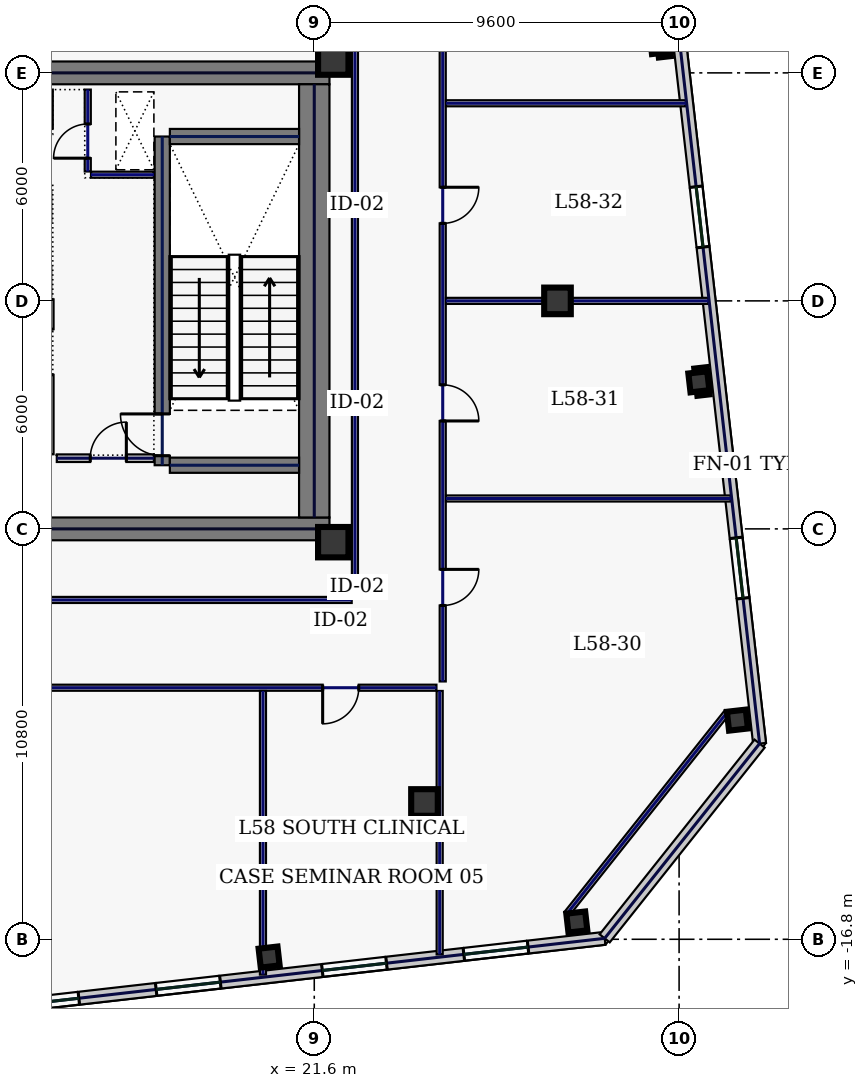
"""IFC4 building model, lengths in metres.
Left out: names, types, materials, properties, quantities, classifications, styles, units other than length and angle.
Written with IfcOpenShell. Run it as: python <this file> out.ifc"""

import sys

from ifc_helpers import new_model, si_unit, direction, frame, frame_2d, origin, origin_2d, place, context, subcontext, project, spatial, rectangle, hollow_rectangle, extrude, element, fill, save


model = new_model("IFC4")
c1 = context("Model", 3, precision=1e-05, world=origin(), true_north=direction((0.0, 1.0)))
c2 = subcontext(c1, "Body", "Model", "MODEL_VIEW")
j1 = project(units=[si_unit("LENGTHUNIT", "METRE"), si_unit("PLANEANGLEUNIT", "RADIAN")], contexts=[c1])
p1 = place(None, origin())
s1 = spatial("IfcSite", under=j1, at=p1, CompositionType="ELEMENT")
p2 = place(p1, origin())
s2 = spatial("IfcBuilding", under=s1, at=p2, CompositionType="ELEMENT")
p3 = place(p2, frame((0.0, 0.0, 251.0)))
s3 = spatial("IfcBuildingStorey", under=s2, at=p3, CompositionType="ELEMENT", Elevation=251.0)
for number, where, z_axis, x_axis in (
    (1, (10.5, 6.0, 0.0), (0.0, 0.0, 1.0), (1.0, 0.0, 0.0)),
    (2, (10.5, -6.0, 0.0), (0.0, 0.0, 1.0), (1.0, 0.0, 0.0)),
):
    element("IfcWall", number, at=place(p3, frame(where, z_axis=z_axis, x_axis=x_axis)), inside=s3, PredefinedType="SHEAR", context=c2, shape_type="SweptSolid", body=[
        extrude(rectangle(XDim=11.5, YDim=0.6, at=frame_2d((5.75, 0.0))), origin(), (0.0, 0.0, 1.0), 3.74),
    ])
p4 = place(p3, frame((21.6, -5.7, 0.0), z_axis=(0.0, 0.0, 1.0), x_axis=(0.0, 1.0, 0.0)))
e3 = element("IfcWall", 3, at=p4, inside=s3, PredefinedType="SHEAR", context=c2, shape_type="SweptSolid", body=[
    extrude(rectangle(XDim=11.4, YDim=0.8, at=frame_2d((5.7, 0.0))), origin(), (0.0, 0.0, 1.0), 3.74),
])
p5 = place(p3, frame((17.6, -4.325, 0.0), z_axis=(0.0, 0.0, 1.0), x_axis=(0.0, 1.0, 0.0)))
e4 = element("IfcWall", 4, at=p5, inside=s3, PredefinedType="SHEAR", context=c2, shape_type="SweptSolid", body=[
    extrude(rectangle(XDim=8.65, YDim=0.4, at=frame_2d((4.325, 0.0))), origin(), (0.0, 0.0, 1.0), 3.74),
])
p6 = place(p5, frame((0.25, 0.0, 0.0)))
e5 = element("IfcOpeningElement", 5, at=p6, cuts=e4, PredefinedType="OPENING", context=c2, shape_type="SweptSolid", body=[
    extrude(rectangle(XDim=1.1, YDim=2.2, at=frame_2d((0.55, 1.1))), frame((0.0, 0.21, 0.0), z_axis=(0.0, -1.0, 0.0), x_axis=(1.0, 0.0, 0.0)), (0.0, 0.0, 1.0), 0.42),
])
for number, where, z_axis, x_axis in (
    (6, (17.8, -4.325, 0.0), (0.0, 0.0, 1.0), (1.0, 0.0, 0.0)),
    (7, (17.8, 4.325, 0.0), (0.0, 0.0, 1.0), (1.0, 0.0, 0.0)),
):
    element("IfcWall", number, at=place(p3, frame(where, z_axis=z_axis, x_axis=x_axis)), inside=s3, PredefinedType="SHEAR", context=c2, shape_type="SweptSolid", body=[
        extrude(rectangle(XDim=3.4, YDim=0.4, at=frame_2d((1.7, 0.0))), origin(), (0.0, 0.0, 1.0), 3.74),
    ])
for number, where, z_axis, x_axis in (
    (8, (22.1, -6.35, 0.0), (0.0, 0.0, 1.0), (1.0, 0.0, 0.0)),
    (9, (22.1, 6.35, 0.0), (0.0, 0.0, 1.0), (1.0, 0.0, 0.0)),
):
    element("IfcColumn", number, at=place(p3, frame(where, z_axis=z_axis, x_axis=x_axis)), inside=s3, PredefinedType="COLUMN", context=c2, shape_type="SweptSolid", body=[
        extrude(hollow_rectangle(XDim=0.8, YDim=0.8, WallThickness=0.036, at=origin_2d()), origin(), (0.0, 0.0, 1.0), 3.74),
    ])
for number, where, z_axis, x_axis in (
    (10, (24.5, -13.2, 0.0), (0.0, 0.0, 1.0), (1.0, 0.0, 0.0)),
    (11, (28.0, 0.0, 0.0), (0.0, 0.0, 1.0), (1.0, 0.0, 0.0)),
):
    element("IfcColumn", number, at=place(p3, frame(where, z_axis=z_axis, x_axis=x_axis)), inside=s3, PredefinedType="COLUMN", context=c2, shape_type="SweptSolid", body=[
        extrude(hollow_rectangle(XDim=0.7, YDim=0.7, WallThickness=0.032, at=origin_2d()), origin(), (0.0, 0.0, 1.0), 3.74),
    ])
for number, where, z_axis, x_axis in (
    (12, (20.412, -17.268, 0.0), (0.0, 0.0, 1.0), (0.994, 0.113, 0.0)),
    (13, (28.509, -16.345, 0.0), (0.0, 0.0, 1.0), (0.994, 0.113, 0.0)),
    (14, (32.734, -11.033, 0.0), (0.0, 0.0, 1.0), (0.994, 0.113, 0.0)),
    (15, (31.72, -2.131, 0.0), (0.0, 0.0, 1.0), (0.994, 0.113, 0.0)),
    (16, (30.706, 6.772, 0.0), (0.0, 0.0, 1.0), (0.994, 0.113, 0.0)),
):
    element("IfcColumn", number, at=place(p3, frame(where, z_axis=z_axis, x_axis=x_axis)), inside=s3, PredefinedType="COLUMN", context=c2, shape_type="SweptSolid", body=[
        extrude(hollow_rectangle(XDim=0.5, YDim=0.5, WallThickness=0.025, at=origin_2d()), origin(), (0.0, 0.0, 1.0), 3.74),
    ])
p7 = place(p3, frame((10.71, -18.886, 0.0), z_axis=(0.0, 0.0, 1.0), x_axis=(0.993572271362, 0.113199565282, 0.0)))
e17 = element("IfcWall", 17, at=p7, inside=s3, PredefinedType="STANDARD", context=c2, shape_type="SweptSolid", body=[
    extrude(rectangle(XDim=18.651, YDim=0.34, at=frame_2d((9.326, 0.0))), origin(), (0.0, 0.0, 1.0), 3.74),
])
p8 = place(p7, frame((3.024, 0.0, 0.88)))
e18 = element("IfcOpeningElement", 18, at=p8, cuts=e17, PredefinedType="OPENING", context=c2, shape_type="SweptSolid", body=[
    extrude(rectangle(XDim=1.7, YDim=1.95, at=frame_2d((0.85, 0.975))), frame((0.0, 0.18, 0.0), z_axis=(0.0, -1.0, 0.0), x_axis=(1.0, 0.0, 0.0)), (0.0, 0.0, 1.0), 0.36),
])
p9 = place(p7, frame((6.773, 0.0, 0.88)))
e19 = element("IfcOpeningElement", 19, at=p9, cuts=e17, PredefinedType="OPENING", context=c2, shape_type="SweptSolid", body=[
    extrude(rectangle(XDim=1.7, YDim=1.95, at=frame_2d((0.85, 0.975))), frame((0.0, 0.18, 0.0), z_axis=(0.0, -1.0, 0.0), x_axis=(1.0, 0.0, 0.0)), (0.0, 0.0, 1.0), 0.36),
])
p10 = place(p7, frame((11.173, 0.0, 0.88)))
e20 = element("IfcOpeningElement", 20, at=p10, cuts=e17, PredefinedType="OPENING", context=c2, shape_type="SweptSolid", body=[
    extrude(rectangle(XDim=1.7, YDim=1.95, at=frame_2d((0.85, 0.975))), frame((0.0, 0.18, 0.0), z_axis=(0.0, -1.0, 0.0), x_axis=(1.0, 0.0, 0.0)), (0.0, 0.0, 1.0), 0.36),
])
p11 = place(p7, frame((14.921, 0.0, 0.88)))
e21 = element("IfcOpeningElement", 21, at=p11, cuts=e17, PredefinedType="OPENING", context=c2, shape_type="SweptSolid", body=[
    extrude(rectangle(XDim=1.7, YDim=1.95, at=frame_2d((0.85, 0.975))), frame((0.0, 0.18, 0.0), z_axis=(0.0, -1.0, 0.0), x_axis=(1.0, 0.0, 0.0)), (0.0, 0.0, 1.0), 0.36),
])
p12 = place(p3, frame((33.318, -11.651, 0.0), z_axis=(0.0, 0.0, 1.0), x_axis=(-0.11320360501, 0.9935718111, 0.0)))
e22 = element("IfcWall", 22, at=p12, inside=s3, PredefinedType="STANDARD", context=c2, shape_type="SweptSolid", body=[
    extrude(rectangle(XDim=37.2, YDim=0.34, at=frame_2d((18.6, 0.0))), origin(), (0.0, 0.0, 1.0), 3.74),
])
p13 = place(p12, frame((3.85, 0.0, 0.58)))
e23 = element("IfcOpeningElement", 23, at=p13, cuts=e22, PredefinedType="OPENING", context=c2, shape_type="SweptSolid", body=[
    extrude(rectangle(XDim=1.6, YDim=2.3, at=frame_2d((0.8, 1.15))), frame((0.0, 0.18, 0.0), z_axis=(0.0, -1.0, 0.0), x_axis=(1.0, 0.0, 0.0)), (0.0, 0.0, 1.0), 0.36),
])
p14 = place(p12, frame((13.15, 0.0, 0.58)))
e24 = element("IfcOpeningElement", 24, at=p14, cuts=e22, PredefinedType="OPENING", context=c2, shape_type="SweptSolid", body=[
    extrude(rectangle(XDim=1.6, YDim=2.3, at=frame_2d((0.8, 1.15))), frame((0.0, 0.18, 0.0), z_axis=(0.0, -1.0, 0.0), x_axis=(1.0, 0.0, 0.0)), (0.0, 0.0, 1.0), 0.36),
])
p15 = place(p12, frame((22.45, 0.0, 0.58)))
e25 = element("IfcOpeningElement", 25, at=p15, cuts=e22, PredefinedType="OPENING", context=c2, shape_type="SweptSolid", body=[
    extrude(rectangle(XDim=1.6, YDim=2.3, at=frame_2d((0.8, 1.15))), frame((0.0, 0.18, 0.0), z_axis=(0.0, -1.0, 0.0), x_axis=(1.0, 0.0, 0.0)), (0.0, 0.0, 1.0), 0.36),
])
p16 = place(p12, frame((31.75, 0.0, 0.58)))
e26 = element("IfcOpeningElement", 26, at=p16, cuts=e22, PredefinedType="OPENING", context=c2, shape_type="SweptSolid", body=[
    extrude(rectangle(XDim=1.6, YDim=2.3, at=frame_2d((0.8, 1.15))), frame((0.0, 0.18, 0.0), z_axis=(0.0, -1.0, 0.0), x_axis=(1.0, 0.0, 0.0)), (0.0, 0.0, 1.0), 0.36),
])
p17 = place(p3, frame((29.242, -16.775, 0.0), z_axis=(0.0, 0.0, 1.0), x_axis=(0.62252823689, 0.78259733853, 0.0)))
e27 = element("IfcWall", 27, at=p17, inside=s3, PredefinedType="STANDARD", context=c2, shape_type="SweptSolid", body=[
    extrude(rectangle(XDim=6.548, YDim=0.34, at=frame_2d((3.274, 0.0))), origin(), (0.0, 0.0, 1.0), 3.74),
])
p18 = place(p3, frame((15.64, 3.405, 0.0), z_axis=(0.0, 0.0, 1.0), x_axis=(0.0, 1.0, 0.0)))
e28 = element("IfcWall", 28, at=p18, inside=s3, PredefinedType="PARTITIONING", context=c2, shape_type="SweptSolid", body=[
    extrude(rectangle(XDim=2.155, YDim=0.16, at=frame_2d((1.078, 0.0))), origin(), (0.0, 0.0, 1.0), 3.74),
])
p19 = place(p18, frame((0.35, 0.0, 0.0)))
e29 = element("IfcOpeningElement", 29, at=p19, cuts=e28, PredefinedType="OPENING", context=c2, shape_type="SweptSolid", body=[
    extrude(rectangle(XDim=0.9, YDim=2.2, at=frame_2d((0.45, 1.1))), frame((0.0, 0.09, 0.0), z_axis=(0.0, -1.0, 0.0), x_axis=(1.0, 0.0, 0.0)), (0.0, 0.0, 1.0), 0.18),
])
p20 = place(p3, frame((15.725, 3.32, 0.0), z_axis=(0.0, 0.0, 1.0), x_axis=(1.0, 0.0, 0.0)))
e30 = element("IfcWall", 30, at=p20, inside=s3, PredefinedType="PARTITIONING", context=c2, shape_type="SweptSolid", body=[
    extrude(rectangle(XDim=1.655, YDim=0.16, at=frame_2d((0.827, 0.0))), origin(), (0.0, 0.0, 1.0), 3.74),
])
p21 = place(p3, frame((14.825, -4.14, 0.0), z_axis=(0.0, 0.0, 1.0), x_axis=(1.0, 0.0, 0.0)))
e31 = element("IfcWall", 31, at=p21, inside=s3, PredefinedType="SOLIDWALL", context=c2, shape_type="SweptSolid", body=[
    extrude(rectangle(XDim=2.555, YDim=0.2, at=frame_2d((1.277, 0.0))), origin(), (0.0, 0.0, 1.0), 3.74),
])
p22 = place(p21, frame((0.88, 0.0, 0.0)))
e32 = element("IfcOpeningElement", 32, at=p22, cuts=e31, PredefinedType="OPENING", context=c2, shape_type="SweptSolid", body=[
    extrude(rectangle(XDim=0.95, YDim=2.2, at=frame_2d((0.475, 1.1))), frame((0.0, 0.11, 0.0), z_axis=(0.0, -1.0, 0.0), x_axis=(1.0, 0.0, 0.0)), (0.0, 0.0, 1.0), 0.22),
])
p23 = place(p3, frame((14.64, -4.035, 0.0), z_axis=(0.0, 0.0, 1.0), x_axis=(0.0, 1.0, 0.0)))
e33 = element("IfcWall", 33, at=p23, inside=s3, PredefinedType="SOLIDWALL", context=c2, shape_type="SweptSolid", body=[
    extrude(rectangle(XDim=4.075, YDim=0.2, at=frame_2d((2.038, 0.0))), origin(), (0.0, 0.0, 1.0), 3.74),
])
p24 = place(p23, frame((2.09, 0.0, 0.0)))
e34 = element("IfcOpeningElement", 34, at=p24, cuts=e33, PredefinedType="OPENING", context=c2, shape_type="SweptSolid", body=[
    extrude(rectangle(XDim=1.2, YDim=2.2, at=frame_2d((0.6, 1.1))), frame((0.0, 0.11, 0.0), z_axis=(0.0, -1.0, 0.0), x_axis=(1.0, 0.0, 0.0)), (0.0, 0.0, 1.0), 0.22),
])
p25 = place(p3, frame((28.242, -16.134, 0.0), z_axis=(0.0, 0.0, 1.0), x_axis=(0.622521563328, 0.782602647064, 0.0)))
e35 = element("IfcWall", 35, at=p25, inside=s3, PredefinedType="PARTITIONING", context=c2, shape_type="SweptSolid", body=[
    extrude(rectangle(XDim=6.788, YDim=0.16, at=frame_2d((3.394, 0.0))), origin(), (0.0, 0.0, 1.0), 3.74),
])
p26 = place(p3, frame((24.98, 10.115, 0.0), z_axis=(0.0, 0.0, 1.0), x_axis=(0.0, -1.0, 0.0)))
e36 = element("IfcWall", 36, at=p26, inside=s3, PredefinedType="PARTITIONING", context=c2, shape_type="SweptSolid", body=[
    extrude(rectangle(XDim=20.13, YDim=0.16, at=frame_2d((10.065, 0.0))), origin(), (0.0, 0.0, 1.0), 3.74),
])
p27 = place(p26, frame((17.181, 0.0, 0.0)))
e37 = element("IfcOpeningElement", 37, at=p27, cuts=e36, PredefinedType="OPENING", context=c2, shape_type="SweptSolid", body=[
    extrude(rectangle(XDim=0.95, YDim=2.2, at=frame_2d((0.475, 1.1))), frame((0.0, 0.09, 0.0), z_axis=(0.0, -1.0, 0.0), x_axis=(1.0, 0.0, 0.0)), (0.0, 0.0, 1.0), 0.18),
])
p28 = place(p26, frame((12.325, 0.0, 0.0)))
e38 = element("IfcOpeningElement", 38, at=p28, cuts=e36, PredefinedType="OPENING", context=c2, shape_type="SweptSolid", body=[
    extrude(rectangle(XDim=0.95, YDim=2.2, at=frame_2d((0.475, 1.1))), frame((0.0, 0.09, 0.0), z_axis=(0.0, -1.0, 0.0), x_axis=(1.0, 0.0, 0.0)), (0.0, 0.0, 1.0), 0.18),
])
p29 = place(p26, frame((7.125, 0.0, 0.0)))
e39 = element("IfcOpeningElement", 39, at=p29, cuts=e36, PredefinedType="OPENING", context=c2, shape_type="SweptSolid", body=[
    extrude(rectangle(XDim=0.95, YDim=2.2, at=frame_2d((0.475, 1.1))), frame((0.0, 0.09, 0.0), z_axis=(0.0, -1.0, 0.0), x_axis=(1.0, 0.0, 0.0)), (0.0, 0.0, 1.0), 0.18),
])
p30 = place(p26, frame((2.219, 0.0, 0.0)))
e40 = element("IfcOpeningElement", 40, at=p30, cuts=e36, PredefinedType="OPENING", context=c2, shape_type="SweptSolid", body=[
    extrude(rectangle(XDim=0.95, YDim=2.2, at=frame_2d((0.475, 1.1))), frame((0.0, 0.09, 0.0), z_axis=(0.0, -1.0, 0.0), x_axis=(1.0, 0.0, 0.0)), (0.0, 0.0, 1.0), 0.18),
])
p31 = place(p3, frame((24.815, -10.18, 0.0), z_axis=(0.0, 0.0, 1.0), x_axis=(-1.0, 0.0, 0.0)))
e41 = element("IfcWall", 41, at=p31, inside=s3, PredefinedType="PARTITIONING", context=c2, shape_type="SweptSolid", body=[
    extrude(rectangle(XDim=37.35, YDim=0.16, at=frame_2d((18.675, 0.0))), origin(), (0.0, 0.0, 1.0), 3.74),
])
p32 = place(p31, frame((29.025, 0.0, 0.0)))
e42 = element("IfcOpeningElement", 42, at=p32, cuts=e41, PredefinedType="OPENING", context=c2, shape_type="SweptSolid", body=[
    extrude(rectangle(XDim=1.3, YDim=2.2, at=frame_2d((0.65, 1.1))), frame((0.0, 0.09, 0.0), z_axis=(0.0, -1.0, 0.0), x_axis=(1.0, 0.0, 0.0)), (0.0, 0.0, 1.0), 0.18),
])
p33 = place(p31, frame((21.6, 0.0, 0.0)))
e43 = element("IfcOpeningElement", 43, at=p33, cuts=e41, PredefinedType="OPENING", context=c2, shape_type="SweptSolid", body=[
    extrude(rectangle(XDim=1.05, YDim=2.2, at=frame_2d((0.525, 1.1))), frame((0.0, 0.09, 0.0), z_axis=(0.0, -1.0, 0.0), x_axis=(1.0, 0.0, 0.0)), (0.0, 0.0, 1.0), 0.18),
])
p34 = place(p31, frame((11.1, 0.0, 0.0)))
e44 = element("IfcOpeningElement", 44, at=p34, cuts=e41, PredefinedType="OPENING", context=c2, shape_type="SweptSolid", body=[
    extrude(rectangle(XDim=0.95, YDim=2.2, at=frame_2d((0.475, 1.1))), frame((0.0, 0.09, 0.0), z_axis=(0.0, -1.0, 0.0), x_axis=(1.0, 0.0, 0.0)), (0.0, 0.0, 1.0), 0.18),
])
p35 = place(p31, frame((2.044, 0.0, 0.0)))
e45 = element("IfcOpeningElement", 45, at=p35, cuts=e41, PredefinedType="OPENING", context=c2, shape_type="SweptSolid", body=[
    extrude(rectangle(XDim=0.95, YDim=2.2, at=frame_2d((0.475, 1.1))), frame((0.0, 0.09, 0.0), z_axis=(0.0, -1.0, 0.0), x_axis=(1.0, 0.0, 0.0)), (0.0, 0.0, 1.0), 0.18),
])
p36 = place(p3, frame((10.715, -7.87, 0.0), z_axis=(0.0, 0.0, 1.0), x_axis=(1.0, 0.0, 0.0)))
e46 = element("IfcWall", 46, at=p36, inside=s3, PredefinedType="PARTITIONING", context=c2, shape_type="SweptSolid", body=[
    extrude(rectangle(XDim=11.87, YDim=0.16, at=frame_2d((5.935, 0.0))), origin(), (0.0, 0.0, 1.0), 3.74),
])
p37 = place(p3, frame((22.67, -7.785, 0.0), z_axis=(0.0, 0.0, 1.0), x_axis=(0.0, 1.0, 0.0)))
e47 = element("IfcWall", 47, at=p37, inside=s3, PredefinedType="PARTITIONING", context=c2, shape_type="SweptSolid", body=[
    extrude(rectangle(XDim=15.67, YDim=0.16, at=frame_2d((7.835, 0.0))), origin(), (0.0, 0.0, 1.0), 3.74),
])
p38 = place(p3, frame((24.9, -17.199, 0.0), z_axis=(0.0, 0.0, 1.0), x_axis=(0.0, 1.0, 0.0)))
e48 = element("IfcWall", 48, at=p38, inside=s3, PredefinedType="PARTITIONING", context=c2, shape_type="SweptSolid", body=[
    extrude(rectangle(XDim=6.935, YDim=0.16, at=frame_2d((3.467, 0.0))), origin(), (0.0, 0.0, 1.0), 3.74),
])
p39 = place(p3, frame((20.25, -17.729, 0.0), z_axis=(0.0, 0.0, 1.0), x_axis=(0.0, 1.0, 0.0)))
e49 = element("IfcWall", 49, at=p39, inside=s3, PredefinedType="PARTITIONING", context=c2, shape_type="SweptSolid", body=[
    extrude(rectangle(XDim=7.464, YDim=0.16, at=frame_2d((3.732, 0.0))), origin(), (0.0, 0.0, 1.0), 3.74),
])
p40 = place(p3, frame((25.065, -5.2, 0.0), z_axis=(0.0, 0.0, 1.0), x_axis=(1.0, 0.0, 0.0)))
e50 = element("IfcWall", 50, at=p40, inside=s3, PredefinedType="PARTITIONING", context=c2, shape_type="SweptSolid", body=[
    extrude(rectangle(XDim=7.498, YDim=0.16, at=frame_2d((3.749, 0.0))), origin(), (0.0, 0.0, 1.0), 3.74),
])
p41 = place(p3, frame((25.065, 0.0, 0.0), z_axis=(0.0, 0.0, 1.0), x_axis=(1.0, 0.0, 0.0)))
e51 = element("IfcWall", 51, at=p41, inside=s3, PredefinedType="PARTITIONING", context=c2, shape_type="SweptSolid", body=[
    extrude(rectangle(XDim=6.906, YDim=0.16, at=frame_2d((3.453, 0.0))), origin(), (0.0, 0.0, 1.0), 3.74),
])
p42 = place(p3, frame((25.065, 5.2, 0.0), z_axis=(0.0, 0.0, 1.0), x_axis=(1.0, 0.0, 0.0)))
e52 = element("IfcWall", 52, at=p42, inside=s3, PredefinedType="PARTITIONING", context=c2, shape_type="SweptSolid", body=[
    extrude(rectangle(XDim=6.313, YDim=0.16, at=frame_2d((3.157, 0.0))), origin(), (0.0, 0.0, 1.0), 3.74),
])
p43 = place(p8, origin())
e53 = element("IfcWindow", 53, at=p43, inside=s3, PartitioningType="SINGLE_PANEL", PredefinedType="WINDOW", context=c2, shape_type="SweptSolid", body=[
    extrude(rectangle(XDim=1.7, YDim=1.95, at=frame_2d((0.85, 0.975))), frame((0.0, 0.03, 0.0), z_axis=(0.0, -1.0, 0.0), x_axis=(1.0, 0.0, 0.0)), (0.0, 0.0, 1.0), 0.06),
])
fill(e18, e53)
p44 = place(p9, origin())
e54 = element("IfcWindow", 54, at=p44, inside=s3, PartitioningType="SINGLE_PANEL", PredefinedType="WINDOW", context=c2, shape_type="SweptSolid", body=[
    extrude(rectangle(XDim=1.7, YDim=1.95, at=frame_2d((0.85, 0.975))), frame((0.0, 0.03, 0.0), z_axis=(0.0, -1.0, 0.0), x_axis=(1.0, 0.0, 0.0)), (0.0, 0.0, 1.0), 0.06),
])
fill(e19, e54)
p45 = place(p10, origin())
e55 = element("IfcWindow", 55, at=p45, inside=s3, PartitioningType="SINGLE_PANEL", PredefinedType="WINDOW", context=c2, shape_type="SweptSolid", body=[
    extrude(rectangle(XDim=1.7, YDim=1.95, at=frame_2d((0.85, 0.975))), frame((0.0, 0.03, 0.0), z_axis=(0.0, -1.0, 0.0), x_axis=(1.0, 0.0, 0.0)), (0.0, 0.0, 1.0), 0.06),
])
fill(e20, e55)
p46 = place(p11, origin())
e56 = element("IfcWindow", 56, at=p46, inside=s3, PartitioningType="SINGLE_PANEL", PredefinedType="WINDOW", context=c2, shape_type="SweptSolid", body=[
    extrude(rectangle(XDim=1.7, YDim=1.95, at=frame_2d((0.85, 0.975))), frame((0.0, 0.03, 0.0), z_axis=(0.0, -1.0, 0.0), x_axis=(1.0, 0.0, 0.0)), (0.0, 0.0, 1.0), 0.06),
])
fill(e21, e56)
p47 = place(p13, origin())
e57 = element("IfcWindow", 57, at=p47, inside=s3, PartitioningType="SINGLE_PANEL", PredefinedType="WINDOW", context=c2, shape_type="SweptSolid", body=[
    extrude(rectangle(XDim=1.6, YDim=2.3, at=frame_2d((0.8, 1.15))), frame((0.0, 0.03, 0.0), z_axis=(0.0, -1.0, 0.0), x_axis=(1.0, 0.0, 0.0)), (0.0, 0.0, 1.0), 0.06),
])
fill(e23, e57)
p48 = place(p14, origin())
e58 = element("IfcWindow", 58, at=p48, inside=s3, PartitioningType="SINGLE_PANEL", PredefinedType="WINDOW", context=c2, shape_type="SweptSolid", body=[
    extrude(rectangle(XDim=1.6, YDim=2.3, at=frame_2d((0.8, 1.15))), frame((0.0, 0.03, 0.0), z_axis=(0.0, -1.0, 0.0), x_axis=(1.0, 0.0, 0.0)), (0.0, 0.0, 1.0), 0.06),
])
fill(e24, e58)
p49 = place(p6, origin())
e59 = element("IfcDoor", 59, at=p49, inside=s3, OperationType="SINGLE_SWING_RIGHT", PredefinedType="DOOR", context=c2, shape_type="SweptSolid", body=[
    extrude(rectangle(XDim=1.1, YDim=2.2, at=frame_2d((0.55, 1.1))), frame((0.0, 0.025, 0.0), z_axis=(0.0, -1.0, 0.0), x_axis=(1.0, 0.0, 0.0)), (0.0, 0.0, 1.0), 0.05),
])
fill(e5, e59)
p50 = place(p19, origin())
e60 = element("IfcDoor", 60, at=p50, inside=s3, OperationType="SINGLE_SWING_LEFT", PredefinedType="DOOR", context=c2, shape_type="SweptSolid", body=[
    extrude(rectangle(XDim=0.9, YDim=2.2, at=frame_2d((0.45, 1.1))), frame((0.0, 0.025, 0.0), z_axis=(0.0, -1.0, 0.0), x_axis=(1.0, 0.0, 0.0)), (0.0, 0.0, 1.0), 0.05),
])
fill(e29, e60)
p51 = place(p22, origin())
e61 = element("IfcDoor", 61, at=p51, inside=s3, OperationType="SINGLE_SWING_RIGHT", PredefinedType="DOOR", context=c2, shape_type="SweptSolid", body=[
    extrude(rectangle(XDim=0.95, YDim=2.2, at=frame_2d((0.475, 1.1))), frame((0.0, 0.025, 0.0), z_axis=(0.0, -1.0, 0.0), x_axis=(1.0, 0.0, 0.0)), (0.0, 0.0, 1.0), 0.05),
])
fill(e32, e61)
p52 = place(p35, origin())
e62 = element("IfcDoor", 62, at=p52, inside=s3, OperationType="SINGLE_SWING_RIGHT", PredefinedType="DOOR", context=c2, shape_type="SweptSolid", body=[
    extrude(rectangle(XDim=0.95, YDim=2.2, at=frame_2d((0.475, 1.1))), frame((0.0, 0.025, 0.0), z_axis=(0.0, -1.0, 0.0), x_axis=(1.0, 0.0, 0.0)), (0.0, 0.0, 1.0), 0.05),
])
fill(e45, e62)
p53 = place(p27, origin())
e63 = element("IfcDoor", 63, at=p53, inside=s3, OperationType="SINGLE_SWING_LEFT", PredefinedType="DOOR", context=c2, shape_type="SweptSolid", body=[
    extrude(rectangle(XDim=0.95, YDim=2.2, at=frame_2d((0.475, 1.1))), frame((0.0, 0.025, 0.0), z_axis=(0.0, -1.0, 0.0), x_axis=(1.0, 0.0, 0.0)), (0.0, 0.0, 1.0), 0.05),
])
fill(e37, e63)
p54 = place(p28, origin())
e64 = element("IfcDoor", 64, at=p54, inside=s3, OperationType="SINGLE_SWING_RIGHT", PredefinedType="DOOR", context=c2, shape_type="SweptSolid", body=[
    extrude(rectangle(XDim=0.95, YDim=2.2, at=frame_2d((0.475, 1.1))), frame((0.0, 0.025, 0.0), z_axis=(0.0, -1.0, 0.0), x_axis=(1.0, 0.0, 0.0)), (0.0, 0.0, 1.0), 0.05),
])
fill(e38, e64)
p55 = place(p29, origin())
e65 = element("IfcDoor", 65, at=p55, inside=s3, OperationType="SINGLE_SWING_LEFT", PredefinedType="DOOR", context=c2, shape_type="SweptSolid", body=[
    extrude(rectangle(XDim=0.95, YDim=2.2, at=frame_2d((0.475, 1.1))), frame((0.0, 0.025, 0.0), z_axis=(0.0, -1.0, 0.0), x_axis=(1.0, 0.0, 0.0)), (0.0, 0.0, 1.0), 0.05),
])
fill(e39, e65)
save(model, sys.argv[1])
